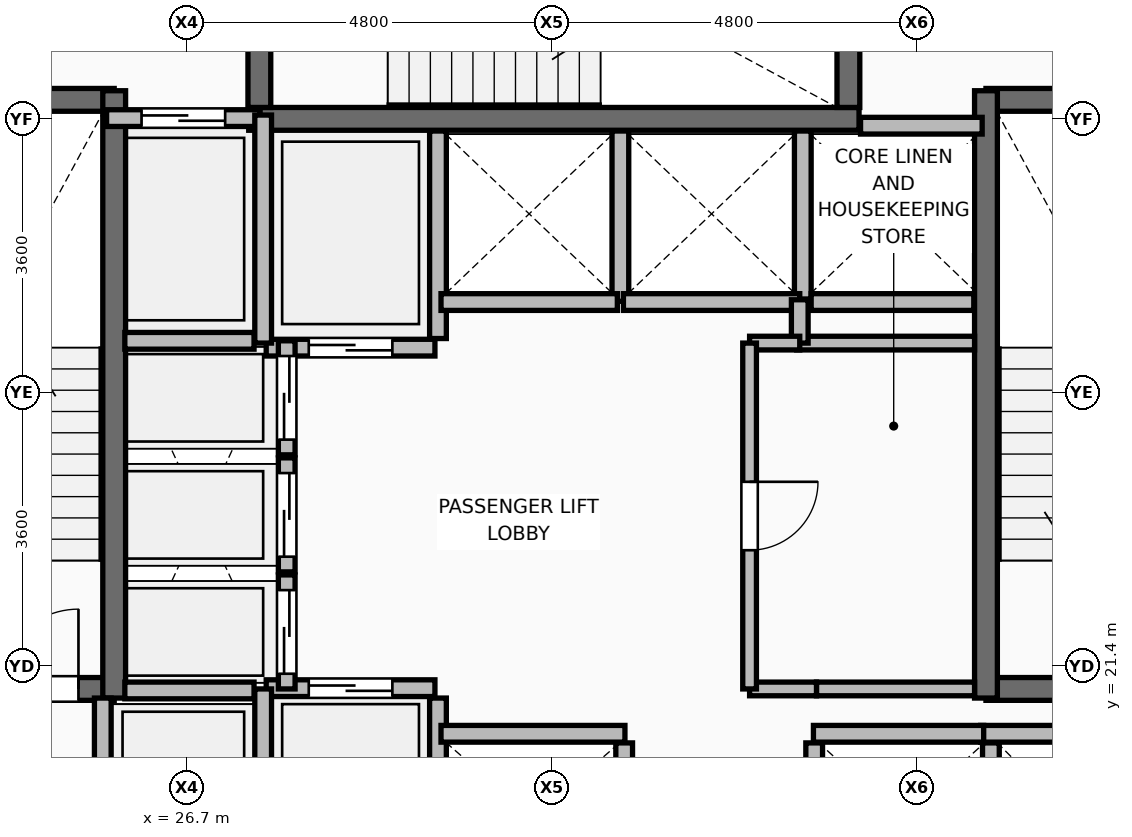
"""IFC4 building model, lengths in metres.
Left out: names, types, materials, properties, quantities, classifications, styles, units other than length and angle.
Written with IfcOpenShell. Run it as: python <this file> out.ifc"""

import sys

from ifc_helpers import new_model, si_unit, direction, frame, frame_2d, origin, place, context, subcontext, project, spatial, rectangle, extrude, element, fill, save


model = new_model("IFC4")
c1 = context("Model", 3, precision=1e-05, world=origin(), true_north=direction((0.0, 1.0)))
c2 = subcontext(c1, "Body", "Model", "MODEL_VIEW")
j1 = project(units=[si_unit("LENGTHUNIT", "METRE"), si_unit("PLANEANGLEUNIT", "RADIAN")], contexts=[c1])
p1 = place(None, origin())
s1 = spatial("IfcSite", under=j1, at=p1, CompositionType="ELEMENT")
p2 = place(p1, origin())
s2 = spatial("IfcBuilding", under=s1, at=p2, CompositionType="ELEMENT")
p3 = place(p2, frame((0.0, 0.0, 87.0)))
s3 = spatial("IfcBuildingStorey", under=s2, at=p3, CompositionType="ELEMENT", Elevation=87.0)
p4 = place(p3, frame((30.0, 18.08, 0.0), z_axis=(0.0, 0.0, 1.0), x_axis=(0.0, 1.0, 0.0)))
e1 = element("IfcWall", 1, at=p4, inside=s3, PredefinedType="PARTITIONING", context=c2, shape_type="SweptSolid", body=[
    extrude(rectangle(XDim=2.9, YDim=0.22, at=frame_2d((1.45, 0.0))), origin(), (0.0, 0.0, 1.0), 3.475),
])
for number, where, z_axis, x_axis in (
    (2, (32.45, 17.92, 0.0), (0.0, 0.0, 1.0), (0.0, 1.0, 0.0)),
    (3, (34.95, 17.92, 0.0), (0.0, 0.0, 1.0), (0.0, 1.0, 0.0)),
):
    element("IfcWall", number, at=place(p3, frame(where, z_axis=z_axis, x_axis=x_axis)), inside=s3, PredefinedType="PARTITIONING", context=c2, shape_type="SweptSolid", body=[
        extrude(rectangle(XDim=2.47, YDim=0.22, at=frame_2d((1.235, 0.0))), origin(), (0.0, 0.0, 1.0), 2.858),
    ])
p5 = place(p3, frame((37.275, 18.08, 0.0), z_axis=(0.0, 0.0, 1.0), x_axis=(0.0, 1.0, 0.0)))
e4 = element("IfcWall", 4, at=p5, inside=s3, PredefinedType="PARTITIONING", context=c2, shape_type="SweptSolid", body=[
    extrude(rectangle(XDim=2.31, YDim=0.22, at=frame_2d((1.155, 0.0))), origin(), (0.0, 0.0, 1.0), 3.475),
])
p6 = place(p3, frame((30.0, 25.71, 0.0), z_axis=(0.0, 0.0, 1.0), x_axis=(0.0, 1.0, 0.0)))
e5 = element("IfcWall", 5, at=p6, inside=s3, PredefinedType="PARTITIONING", context=c2, shape_type="SweptSolid", body=[
    extrude(rectangle(XDim=2.73, YDim=0.22, at=frame_2d((1.365, 0.0))), origin(), (0.0, 0.0, 1.0), 3.475),
])
p7 = place(p3, frame((32.4, 26.2, 0.0), z_axis=(0.0, 0.0, 1.0), x_axis=(0.0, 1.0, 0.0)))
e6 = element("IfcWall", 6, at=p7, inside=s3, PredefinedType="PARTITIONING", context=c2, shape_type="SweptSolid", body=[
    extrude(rectangle(XDim=2.24, YDim=0.22, at=frame_2d((1.12, 0.0))), origin(), (0.0, 0.0, 1.0), 3.475),
])
p8 = place(p3, frame((34.8, 26.23, 0.0), z_axis=(0.0, 0.0, 1.0), x_axis=(0.0, 1.0, 0.0)))
e7 = element("IfcWall", 7, at=p8, inside=s3, PredefinedType="PARTITIONING", context=c2, shape_type="SweptSolid", body=[
    extrude(rectangle(XDim=2.21, YDim=0.22, at=frame_2d((1.105, 0.0))), origin(), (0.0, 0.0, 1.0), 3.475),
])
p9 = place(p3, frame((34.91, 26.19, 0.0), z_axis=(0.0, 0.0, 1.0), x_axis=(1.0, 0.0, 0.0)))
e8 = element("IfcWall", 8, at=p9, inside=s3, PredefinedType="PARTITIONING", context=c2, shape_type="SweptSolid", body=[
    extrude(rectangle(XDim=2.14, YDim=0.22, at=frame_2d((1.07, 0.0))), origin(), (0.0, 0.0, 1.0), 3.475),
])
p10 = place(p3, frame((22.225, 21.1, 0.0), z_axis=(0.0, 0.0, 1.0), x_axis=(1.0, 0.0, 0.0)))
e9 = element("IfcWall", 9, at=p10, inside=s3, PredefinedType="SHEAR", context=c2, shape_type="SweptSolid", body=[
    extrude(rectangle(XDim=3.515, YDim=0.3, at=frame_2d((1.757, 0.0))), origin(), (0.0, 0.0, 1.0), 3.5),
])
p11 = place(p10, frame((1.995, 0.0, 0.0)))
e10 = element("IfcOpeningElement", 10, at=p11, cuts=e9, PredefinedType="OPENING", context=c2, shape_type="SweptSolid", body=[
    extrude(rectangle(XDim=1.05, YDim=2.1, at=frame_2d((0.525, 1.05))), frame((0.0, 0.16, 0.0), z_axis=(0.0, -1.0, 0.0), x_axis=(1.0, 0.0, 0.0)), (0.0, 0.0, 1.0), 0.32),
])
p12 = place(p3, frame((22.225, 28.85, 0.0), z_axis=(0.0, 0.0, 1.0), x_axis=(1.0, 0.0, 0.0)))
e11 = element("IfcWall", 11, at=p12, inside=s3, PredefinedType="SHEAR", context=c2, shape_type="SweptSolid", body=[
    extrude(rectangle(XDim=3.515, YDim=0.3, at=frame_2d((1.757, 0.0))), origin(), (0.0, 0.0, 1.0), 3.5),
])
p13 = place(p3, frame((25.74, 20.98, 0.0), z_axis=(0.0, 0.0, 1.0), x_axis=(0.0, 1.0, 0.0)))
e12 = element("IfcWall", 12, at=p13, inside=s3, PredefinedType="SHEAR", context=c2, shape_type="SweptSolid", body=[
    extrude(rectangle(XDim=7.99, YDim=0.3, at=frame_2d((3.995, 0.0))), origin(), (0.0, 0.0, 1.0), 3.5),
])
for number, where, z_axis, x_axis in (
    (13, (37.21, 21.1, 0.0), (0.0, 0.0, 1.0), (1.0, 0.0, 0.0)),
    (14, (37.21, 28.85, 0.0), (0.0, 0.0, 1.0), (1.0, 0.0, 0.0)),
):
    element("IfcWall", number, at=place(p3, frame(where, z_axis=z_axis, x_axis=x_axis)), inside=s3, PredefinedType="SHEAR", context=c2, shape_type="SweptSolid", body=[
        extrude(rectangle(XDim=3.565, YDim=0.3, at=frame_2d((1.782, 0.0))), origin(), (0.0, 0.0, 1.0), 3.5),
    ])
p14 = place(p3, frame((37.21, 20.98, 0.0), z_axis=(0.0, 0.0, 1.0), x_axis=(0.0, 1.0, 0.0)))
e15 = element("IfcWall", 15, at=p14, inside=s3, PredefinedType="SHEAR", context=c2, shape_type="SweptSolid", body=[
    extrude(rectangle(XDim=7.99, YDim=0.3, at=frame_2d((3.995, 0.0))), origin(), (0.0, 0.0, 1.0), 3.5),
])
p15 = place(p3, frame((27.51, 28.6, 0.0), z_axis=(0.0, 0.0, 1.0), x_axis=(1.0, 0.0, 0.0)))
e16 = element("IfcWall", 16, at=p15, inside=s3, PredefinedType="SHEAR", context=c2, shape_type="SweptSolid", body=[
    extrude(rectangle(XDim=8.03, YDim=0.3, at=frame_2d((4.015, 0.0))), origin(), (0.0, 0.0, 1.0), 3.5),
])
p16 = place(p3, frame((27.65, 28.75, 0.0), z_axis=(0.0, 0.0, 1.0), x_axis=(0.0, 1.0, 0.0)))
e17 = element("IfcWall", 17, at=p16, inside=s3, PredefinedType="SHEAR", context=c2, shape_type="SweptSolid", body=[
    extrude(rectangle(XDim=3.375, YDim=0.3, at=frame_2d((1.688, 0.0))), origin(), (0.0, 0.0, 1.0), 3.5),
])
p17 = place(p16, frame((1.0, 0.0, 0.0)))
e18 = element("IfcOpeningElement", 18, at=p17, cuts=e17, PredefinedType="OPENING", context=c2, shape_type="SweptSolid", body=[
    extrude(rectangle(XDim=1.05, YDim=2.1, at=frame_2d((0.525, 1.05))), frame((0.0, 0.16, 0.0), z_axis=(0.0, -1.0, 0.0), x_axis=(1.0, 0.0, 0.0)), (0.0, 0.0, 1.0), 0.32),
])
p18 = place(p3, frame((35.4, 28.75, 0.0), z_axis=(0.0, 0.0, 1.0), x_axis=(0.0, 1.0, 0.0)))
e19 = element("IfcWall", 19, at=p18, inside=s3, PredefinedType="SHEAR", context=c2, shape_type="SweptSolid", body=[
    extrude(rectangle(XDim=3.375, YDim=0.3, at=frame_2d((1.688, 0.0))), origin(), (0.0, 0.0, 1.0), 3.5),
])
p19 = place(p3, frame((25.59, 18.22, 0.0), z_axis=(0.0, 0.0, 1.0), x_axis=(0.0, 1.0, 0.0)))
e20 = element("IfcWall", 20, at=p19, inside=s3, PredefinedType="PARTITIONING", context=c2, shape_type="SweptSolid", body=[
    extrude(rectangle(XDim=2.76, YDim=0.22, at=frame_2d((1.38, 0.0))), origin(), (0.0, 0.0, 1.0), 3.48),
])
p20 = place(p19, frame((0.83, 0.0, 0.0)))
e21 = element("IfcOpeningElement", 21, at=p20, cuts=e20, PredefinedType="OPENING", context=c2, shape_type="SweptSolid", body=[
    extrude(rectangle(XDim=1.1, YDim=2.2, at=frame_2d((0.55, 1.1))), frame((0.0, 0.12, 0.0), z_axis=(0.0, -1.0, 0.0), x_axis=(1.0, 0.0, 0.0)), (0.0, 0.0, 1.0), 0.24),
])
p21 = place(p3, frame((25.64, 28.61, 0.0), z_axis=(0.0, 0.0, 1.0), x_axis=(1.0, 0.0, 0.0)))
e22 = element("IfcWall", 22, at=p21, inside=s3, PredefinedType="PARTITIONING", context=c2, shape_type="SweptSolid", body=[
    extrude(rectangle(XDim=2.02, YDim=0.22, at=frame_2d((1.01, 0.0))), origin(), (0.0, 0.0, 1.0), 3.48),
])
p22 = place(p21, frame((0.46, 0.0, 0.0)))
e23 = element("IfcOpeningElement", 23, at=p22, cuts=e22, PredefinedType="OPENING", context=c2, shape_type="SweptSolid", body=[
    extrude(rectangle(XDim=1.1, YDim=2.2, at=frame_2d((0.55, 1.1))), frame((0.0, 0.12, 0.0), z_axis=(0.0, -1.0, 0.0), x_axis=(1.0, 0.0, 0.0)), (0.0, 0.0, 1.0), 0.24),
])
p23 = place(p3, frame((27.74, 21.11, 0.0), z_axis=(0.0, 0.0, 1.0), x_axis=(1.0, 0.0, 0.0)))
e24 = element("IfcWall", 24, at=p23, inside=s3, PredefinedType="PARTITIONING", context=c2, shape_type="SweptSolid", body=[
    extrude(rectangle(XDim=2.22, YDim=0.22, at=frame_2d((1.11, 0.0))), origin(), (0.0, 0.0, 1.0), 3.48),
])
p24 = place(p23, frame((0.56, 0.0, 0.0)))
e25 = element("IfcOpeningElement", 25, at=p24, cuts=e24, PredefinedType="OPENING", context=c2, shape_type="SweptSolid", body=[
    extrude(rectangle(XDim=1.1, YDim=2.2, at=frame_2d((0.55, 1.1))), frame((0.0, 0.12, 0.0), z_axis=(0.0, -1.0, 0.0), x_axis=(1.0, 0.0, 0.0)), (0.0, 0.0, 1.0), 0.24),
])
p25 = place(p3, frame((27.74, 25.59, 0.0), z_axis=(0.0, 0.0, 1.0), x_axis=(1.0, 0.0, 0.0)))
e26 = element("IfcWall", 26, at=p25, inside=s3, PredefinedType="PARTITIONING", context=c2, shape_type="SweptSolid", body=[
    extrude(rectangle(XDim=2.22, YDim=0.22, at=frame_2d((1.11, 0.0))), origin(), (0.0, 0.0, 1.0), 3.48),
])
p26 = place(p25, frame((0.56, 0.0, 0.0)))
e27 = element("IfcOpeningElement", 27, at=p26, cuts=e26, PredefinedType="OPENING", context=c2, shape_type="SweptSolid", body=[
    extrude(rectangle(XDim=1.1, YDim=2.2, at=frame_2d((0.55, 1.1))), frame((0.0, 0.12, 0.0), z_axis=(0.0, -1.0, 0.0), x_axis=(1.0, 0.0, 0.0)), (0.0, 0.0, 1.0), 0.24),
])
p27 = place(p3, frame((30.04, 20.51, 0.0), z_axis=(0.0, 0.0, 1.0), x_axis=(1.0, 0.0, 0.0)))
e28 = element("IfcWall", 28, at=p27, inside=s3, PredefinedType="PARTITIONING", context=c2, shape_type="SweptSolid", body=[
    extrude(rectangle(XDim=2.42, YDim=0.22, at=frame_2d((1.21, 0.0))), origin(), (0.0, 0.0, 1.0), 3.48),
])
for number, where, z_axis, x_axis in (
    (29, (37.14, 20.51, 0.0), (0.0, 0.0, 1.0), (1.0, 0.0, 0.0)),
    (30, (34.94, 20.51, 0.0), (0.0, 0.0, 1.0), (1.0, 0.0, 0.0)),
):
    element("IfcWall", number, at=place(p3, frame(where, z_axis=z_axis, x_axis=x_axis)), inside=s3, PredefinedType="PARTITIONING", context=c2, shape_type="SweptSolid", body=[
        extrude(rectangle(XDim=2.24, YDim=0.22, at=frame_2d((1.12, 0.0))), origin(), (0.0, 0.0, 1.0), 3.48),
    ])
for number, where, z_axis, x_axis in (
    (31, (30.04, 26.19, 0.0), (0.0, 0.0, 1.0), (1.0, 0.0, 0.0)),
    (32, (32.44, 26.19, 0.0), (0.0, 0.0, 1.0), (1.0, 0.0, 0.0)),
):
    element("IfcWall", number, at=place(p3, frame(where, z_axis=z_axis, x_axis=x_axis)), inside=s3, PredefinedType="PARTITIONING", context=c2, shape_type="SweptSolid", body=[
        extrude(rectangle(XDim=2.32, YDim=0.22, at=frame_2d((1.16, 0.0))), origin(), (0.0, 0.0, 1.0), 3.48),
    ])
p28 = place(p3, frame((35.56, 28.51, 0.0), z_axis=(0.0, 0.0, 1.0), x_axis=(1.0, 0.0, 0.0)))
e33 = element("IfcWall", 33, at=p28, inside=s3, PredefinedType="PARTITIONING", context=c2, shape_type="SweptSolid", body=[
    extrude(rectangle(XDim=1.6, YDim=0.22, at=frame_2d((0.8, 0.0))), origin(), (0.0, 0.0, 1.0), 3.48),
])
p29 = place(p3, frame((28.01, 21.1, 0.0), z_axis=(0.0, 0.0, 1.0), x_axis=(0.0, 1.0, 0.0)))
e34 = element("IfcWall", 34, at=p29, inside=s3, PredefinedType="PARTITIONING", context=c2, shape_type="SweptSolid", body=[
    extrude(rectangle(XDim=1.5, YDim=0.22, at=frame_2d((0.75, 0.0))), origin(), (0.0, 0.0, 1.0), 3.48),
])
p30 = place(p29, frame((0.2, 0.0, 0.0)))
e35 = element("IfcOpeningElement", 35, at=p30, cuts=e34, PredefinedType="OPENING", context=c2, shape_type="SweptSolid", body=[
    extrude(rectangle(XDim=1.1, YDim=2.2, at=frame_2d((0.55, 1.1))), frame((0.0, 0.12, 0.0), z_axis=(0.0, -1.0, 0.0), x_axis=(1.0, 0.0, 0.0)), (0.0, 0.0, 1.0), 0.24),
])
p31 = place(p3, frame((28.01, 22.64, 0.0), z_axis=(0.0, 0.0, 1.0), x_axis=(0.0, 1.0, 0.0)))
e36 = element("IfcWall", 36, at=p31, inside=s3, PredefinedType="PARTITIONING", context=c2, shape_type="SweptSolid", body=[
    extrude(rectangle(XDim=1.5, YDim=0.22, at=frame_2d((0.75, 0.0))), origin(), (0.0, 0.0, 1.0), 3.48),
])
p32 = place(p31, frame((0.2, 0.0, 0.0)))
e37 = element("IfcOpeningElement", 37, at=p32, cuts=e36, PredefinedType="OPENING", context=c2, shape_type="SweptSolid", body=[
    extrude(rectangle(XDim=1.1, YDim=2.2, at=frame_2d((0.55, 1.1))), frame((0.0, 0.12, 0.0), z_axis=(0.0, -1.0, 0.0), x_axis=(1.0, 0.0, 0.0)), (0.0, 0.0, 1.0), 0.24),
])
p33 = place(p3, frame((28.01, 24.18, 0.0), z_axis=(0.0, 0.0, 1.0), x_axis=(0.0, 1.0, 0.0)))
e38 = element("IfcWall", 38, at=p33, inside=s3, PredefinedType="PARTITIONING", context=c2, shape_type="SweptSolid", body=[
    extrude(rectangle(XDim=1.5, YDim=0.22, at=frame_2d((0.75, 0.0))), origin(), (0.0, 0.0, 1.0), 3.48),
])
p34 = place(p33, frame((0.2, 0.0, 0.0)))
e39 = element("IfcOpeningElement", 39, at=p34, cuts=e38, PredefinedType="OPENING", context=c2, shape_type="SweptSolid", body=[
    extrude(rectangle(XDim=1.1, YDim=2.2, at=frame_2d((0.55, 1.1))), frame((0.0, 0.12, 0.0), z_axis=(0.0, -1.0, 0.0), x_axis=(1.0, 0.0, 0.0)), (0.0, 0.0, 1.0), 0.24),
])
p35 = place(p3, frame((27.7, 18.15, 0.0), z_axis=(0.0, 0.0, 1.0), x_axis=(0.0, 1.0, 0.0)))
e40 = element("IfcWall", 40, at=p35, inside=s3, PredefinedType="PARTITIONING", context=c2, shape_type="SweptSolid", body=[
    extrude(rectangle(XDim=2.95, YDim=0.22, at=frame_2d((1.475, 0.0))), origin(), (0.0, 0.0, 1.0), 3.48),
])
p36 = place(p3, frame((27.7, 25.65, 0.0), z_axis=(0.0, 0.0, 1.0), x_axis=(0.0, 1.0, 0.0)))
e41 = element("IfcWall", 41, at=p36, inside=s3, PredefinedType="PARTITIONING", context=c2, shape_type="SweptSolid", body=[
    extrude(rectangle(XDim=3.0, YDim=0.22, at=frame_2d((1.5, 0.0))), origin(), (0.0, 0.0, 1.0), 3.48),
])
for number, where, z_axis, x_axis in (
    (42, (25.88, 21.08, 0.0), (0.0, 0.0, 1.0), (1.0, 0.0, 0.0)),
    (43, (25.88, 25.68, 0.0), (0.0, 0.0, 1.0), (1.0, 0.0, 0.0)),
):
    element("IfcWall", number, at=place(p3, frame(where, z_axis=z_axis, x_axis=x_axis)), inside=s3, PredefinedType="PARTITIONING", context=c2, shape_type="SweptSolid", body=[
        extrude(rectangle(XDim=1.7, YDim=0.22, at=frame_2d((0.85, 0.0))), origin(), (0.0, 0.0, 1.0), 3.48),
    ])
p37 = place(p3, frame((34.98, 21.1, 0.0), z_axis=(0.0, 0.0, 1.0), x_axis=(1.0, 0.0, 0.0)))
e44 = element("IfcWall", 44, at=p37, inside=s3, PredefinedType="PARTITIONING", context=c2, shape_type="SweptSolid", body=[
    extrude(rectangle(XDim=2.08, YDim=0.18, at=frame_2d((1.04, 0.0))), origin(), (0.0, 0.0, 1.0), 3.48),
])
p38 = place(p3, frame((34.72, 25.65, 0.0), z_axis=(0.0, 0.0, 1.0), x_axis=(1.0, 0.0, 0.0)))
e45 = element("IfcWall", 45, at=p38, inside=s3, PredefinedType="PARTITIONING", context=c2, shape_type="SweptSolid", body=[
    extrude(rectangle(XDim=2.34, YDim=0.18, at=frame_2d((1.17, 0.0))), origin(), (0.0, 0.0, 1.0), 3.48),
])
p39 = place(p3, frame((34.76, 25.65, 0.0), z_axis=(0.0, 0.0, 1.0), x_axis=(0.0, 1.0, 0.0)))
e46 = element("IfcWall", 46, at=p39, inside=s3, PredefinedType="PARTITIONING", context=c2, shape_type="SweptSolid", body=[
    extrude(rectangle(XDim=0.57, YDim=0.22, at=frame_2d((0.285, 0.0))), origin(), (0.0, 0.0, 1.0), 3.48),
])
p40 = place(p3, frame((34.1, 21.1, 0.0), z_axis=(0.0, 0.0, 1.0), x_axis=(1.0, 0.0, 0.0)))
e47 = element("IfcWall", 47, at=p40, inside=s3, PredefinedType="PARTITIONING", context=c2, shape_type="SweptSolid", body=[
    extrude(rectangle(XDim=0.88, YDim=0.18, at=frame_2d((0.44, 0.0))), origin(), (0.0, 0.0, 1.0), 3.48),
])
p41 = place(p3, frame((34.1, 25.65, 0.0), z_axis=(0.0, 0.0, 1.0), x_axis=(1.0, 0.0, 0.0)))
e48 = element("IfcWall", 48, at=p41, inside=s3, PredefinedType="PARTITIONING", context=c2, shape_type="SweptSolid", body=[
    extrude(rectangle(XDim=0.66, YDim=0.18, at=frame_2d((0.33, 0.0))), origin(), (0.0, 0.0, 1.0), 3.48),
])
p42 = place(p3, frame((34.1, 21.1, 0.0), z_axis=(0.0, 0.0, 1.0), x_axis=(0.0, 1.0, 0.0)))
e49 = element("IfcWall", 49, at=p42, inside=s3, PredefinedType="PARTITIONING", context=c2, shape_type="SweptSolid", body=[
    extrude(rectangle(XDim=4.55, YDim=0.18, at=frame_2d((2.275, 0.0))), origin(), (0.0, 0.0, 1.0), 3.48),
])
p43 = place(p42, frame((1.825, 0.0, 0.0)))
e50 = element("IfcOpeningElement", 50, at=p43, cuts=e49, PredefinedType="OPENING", context=c2, shape_type="SweptSolid", body=[
    extrude(rectangle(XDim=0.9, YDim=2.1, at=frame_2d((0.45, 1.05))), frame((0.0, 0.1, 0.0), z_axis=(0.0, -1.0, 0.0), x_axis=(1.0, 0.0, 0.0)), (0.0, 0.0, 1.0), 0.2),
])
p44 = place(p11, origin())
e51 = element("IfcDoor", 51, at=p44, inside=s3, OperationType="SINGLE_SWING_RIGHT", PredefinedType="DOOR", context=c2, shape_type="SweptSolid", body=[
    extrude(rectangle(XDim=1.05, YDim=2.1, at=frame_2d((0.525, 1.05))), frame((0.0, 0.025, 0.0), z_axis=(0.0, -1.0, 0.0), x_axis=(1.0, 0.0, 0.0)), (0.0, 0.0, 1.0), 0.05),
])
fill(e10, e51)
p45 = place(p22, origin())
e52 = element("IfcDoor", 52, at=p45, inside=s3, OperationType="DOUBLE_DOOR_SLIDING", PredefinedType="DOOR", context=c2, shape_type="SweptSolid", body=[
    extrude(rectangle(XDim=1.1, YDim=2.2, at=frame_2d((0.55, 1.1))), frame((0.0, 0.025, 0.0), z_axis=(0.0, -1.0, 0.0), x_axis=(1.0, 0.0, 0.0)), (0.0, 0.0, 1.0), 0.05),
])
fill(e23, e52)
p46 = place(p24, origin())
e53 = element("IfcDoor", 53, at=p46, inside=s3, OperationType="DOUBLE_DOOR_SLIDING", PredefinedType="DOOR", context=c2, shape_type="SweptSolid", body=[
    extrude(rectangle(XDim=1.1, YDim=2.2, at=frame_2d((0.55, 1.1))), frame((0.0, 0.025, 0.0), z_axis=(0.0, -1.0, 0.0), x_axis=(1.0, 0.0, 0.0)), (0.0, 0.0, 1.0), 0.05),
])
fill(e25, e53)
p47 = place(p26, frame((1.1, 0.0, 0.0), z_axis=(0.0, 0.0, 1.0), x_axis=(-1.0, 0.0, 0.0)))
e54 = element("IfcDoor", 54, at=p47, inside=s3, OperationType="DOUBLE_DOOR_SLIDING", PredefinedType="DOOR", context=c2, shape_type="SweptSolid", body=[
    extrude(rectangle(XDim=1.1, YDim=2.2, at=frame_2d((0.55, 1.1))), frame((0.0, 0.025, 0.0), z_axis=(0.0, -1.0, 0.0), x_axis=(1.0, 0.0, 0.0)), (0.0, 0.0, 1.0), 0.05),
])
fill(e27, e54)
p48 = place(p30, frame((1.1, 0.0, 0.0), z_axis=(0.0, 0.0, 1.0), x_axis=(-1.0, 0.0, 0.0)))
e55 = element("IfcDoor", 55, at=p48, inside=s3, OperationType="DOUBLE_DOOR_SLIDING", PredefinedType="DOOR", context=c2, shape_type="SweptSolid", body=[
    extrude(rectangle(XDim=1.1, YDim=2.2, at=frame_2d((0.55, 1.1))), frame((0.0, 0.025, 0.0), z_axis=(0.0, -1.0, 0.0), x_axis=(1.0, 0.0, 0.0)), (0.0, 0.0, 1.0), 0.05),
])
fill(e35, e55)
p49 = place(p32, frame((1.1, 0.0, 0.0), z_axis=(0.0, 0.0, 1.0), x_axis=(-1.0, 0.0, 0.0)))
e56 = element("IfcDoor", 56, at=p49, inside=s3, OperationType="DOUBLE_DOOR_SLIDING", PredefinedType="DOOR", context=c2, shape_type="SweptSolid", body=[
    extrude(rectangle(XDim=1.1, YDim=2.2, at=frame_2d((0.55, 1.1))), frame((0.0, 0.025, 0.0), z_axis=(0.0, -1.0, 0.0), x_axis=(1.0, 0.0, 0.0)), (0.0, 0.0, 1.0), 0.05),
])
fill(e37, e56)
p50 = place(p34, frame((1.1, 0.0, 0.0), z_axis=(0.0, 0.0, 1.0), x_axis=(-1.0, 0.0, 0.0)))
e57 = element("IfcDoor", 57, at=p50, inside=s3, OperationType="DOUBLE_DOOR_SLIDING", PredefinedType="DOOR", context=c2, shape_type="SweptSolid", body=[
    extrude(rectangle(XDim=1.1, YDim=2.2, at=frame_2d((0.55, 1.1))), frame((0.0, 0.025, 0.0), z_axis=(0.0, -1.0, 0.0), x_axis=(1.0, 0.0, 0.0)), (0.0, 0.0, 1.0), 0.05),
])
fill(e39, e57)
p51 = place(p43, frame((0.9, 0.0, 0.0), z_axis=(0.0, 0.0, 1.0), x_axis=(-1.0, 0.0, 0.0)))
e58 = element("IfcDoor", 58, at=p51, inside=s3, OperationType="SINGLE_SWING_LEFT", PredefinedType="DOOR", context=c2, shape_type="SweptSolid", body=[
    extrude(rectangle(XDim=0.9, YDim=2.1, at=frame_2d((0.45, 1.05))), frame((0.0, 0.025, 0.0), z_axis=(0.0, -1.0, 0.0), x_axis=(1.0, 0.0, 0.0)), (0.0, 0.0, 1.0), 0.05),
])
fill(e50, e58)
save(model, sys.argv[1])
